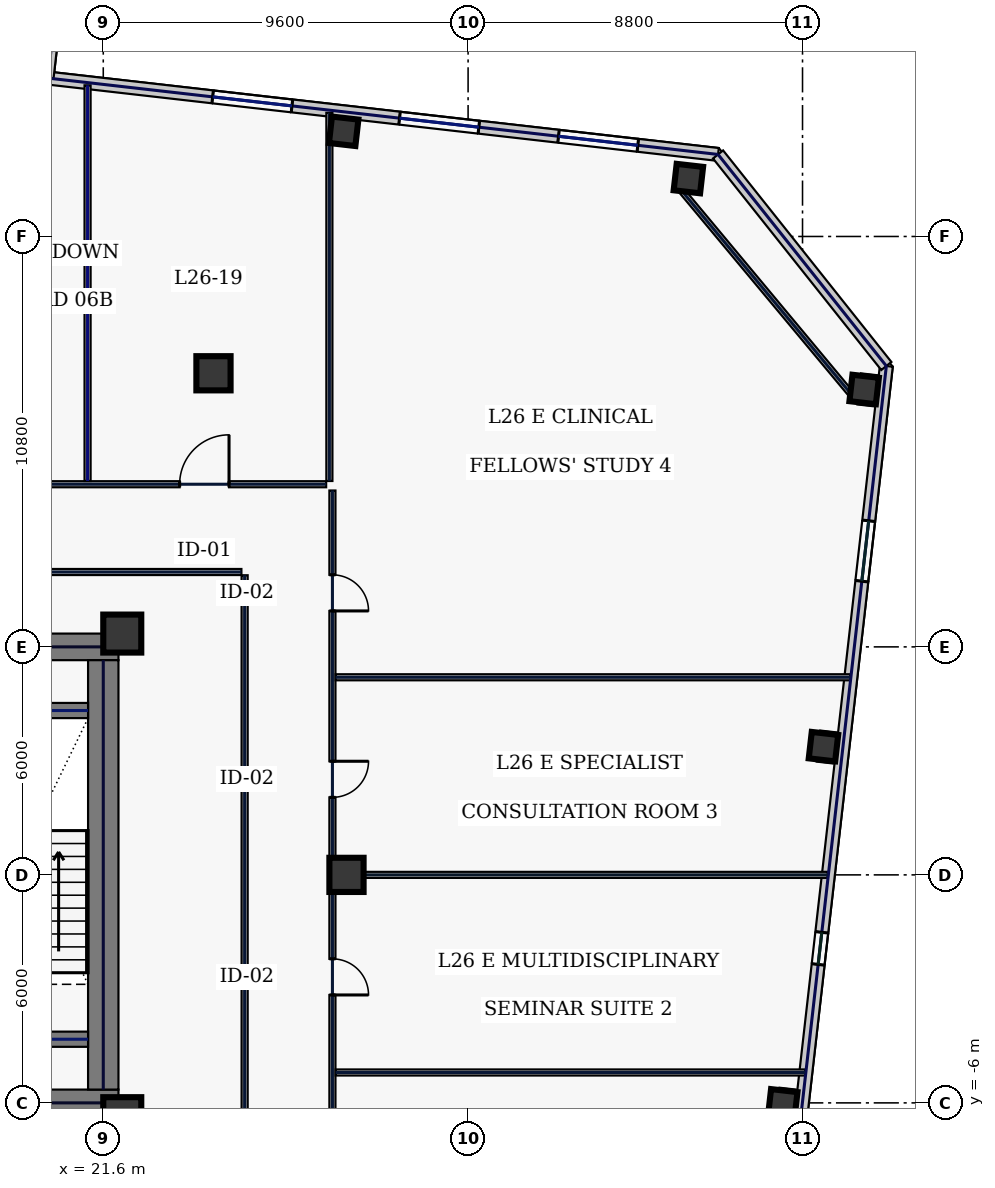
"""IFC4 building model, lengths in metres.
Left out: names, types, materials, properties, quantities, classifications, styles, units other than length and angle.
Written with IfcOpenShell. Run it as: python <this file> out.ifc"""

import sys

from ifc_helpers import new_model, si_unit, direction, frame, frame_2d, origin, origin_2d, place, context, subcontext, project, spatial, rectangle, hollow_rectangle, extrude, element, fill, save


model = new_model("IFC4")
c1 = context("Model", 3, precision=1e-05, world=origin(), true_north=direction((0.0, 1.0)))
c2 = subcontext(c1, "Body", "Model", "MODEL_VIEW")
j1 = project(units=[si_unit("LENGTHUNIT", "METRE"), si_unit("PLANEANGLEUNIT", "RADIAN")], contexts=[c1])
p1 = place(None, origin())
s1 = spatial("IfcSite", under=j1, at=p1, CompositionType="ELEMENT")
p2 = place(p1, origin())
s2 = spatial("IfcBuilding", under=s1, at=p2, CompositionType="ELEMENT")
p3 = place(p2, frame((0.0, 0.0, 117.4)))
s3 = spatial("IfcBuildingStorey", under=s2, at=p3, CompositionType="ELEMENT", Elevation=117.4)
for number, where, z_axis, x_axis in (
    (1, (10.45, 6.0, 0.0), (0.0, 0.0, 1.0), (1.0, 0.0, 0.0)),
    (2, (10.45, -6.0, 0.0), (0.0, 0.0, 1.0), (1.0, 0.0, 0.0)),
):
    element("IfcWall", number, at=place(p3, frame(where, z_axis=z_axis, x_axis=x_axis)), inside=s3, PredefinedType="SHEAR", context=c2, shape_type="SweptSolid", body=[
        extrude(rectangle(XDim=11.55, YDim=0.7, at=frame_2d((5.775, 0.0))), origin(), (0.0, 0.0, 1.0), 3.74),
    ])
p4 = place(p3, frame((21.6, -5.65, 0.0), z_axis=(0.0, 0.0, 1.0), x_axis=(0.0, 1.0, 0.0)))
e3 = element("IfcWall", 3, at=p4, inside=s3, PredefinedType="SHEAR", context=c2, shape_type="SweptSolid", body=[
    extrude(rectangle(XDim=11.3, YDim=0.8, at=frame_2d((5.65, 0.0))), origin(), (0.0, 0.0, 1.0), 3.74),
])
for number, where, z_axis, x_axis in (
    (4, (17.8, -4.325, 0.0), (0.0, 0.0, 1.0), (1.0, 0.0, 0.0)),
    (5, (17.8, 4.325, 0.0), (0.0, 0.0, 1.0), (1.0, 0.0, 0.0)),
):
    element("IfcWall", number, at=place(p3, frame(where, z_axis=z_axis, x_axis=x_axis)), inside=s3, PredefinedType="SHEAR", context=c2, shape_type="SweptSolid", body=[
        extrude(rectangle(XDim=3.4, YDim=0.4, at=frame_2d((1.7, 0.0))), origin(), (0.0, 0.0, 1.0), 3.74),
    ])
for number, where, z_axis, x_axis in (
    (6, (22.1, -6.35, 0.0), (0.0, 0.0, 1.0), (1.0, 0.0, 0.0)),
    (7, (22.1, 6.35, 0.0), (0.0, 0.0, 1.0), (1.0, 0.0, 0.0)),
):
    element("IfcColumn", number, at=place(p3, frame(where, z_axis=z_axis, x_axis=x_axis)), inside=s3, PredefinedType="COLUMN", context=c2, shape_type="SweptSolid", body=[
        extrude(hollow_rectangle(XDim=1.0, YDim=1.0, WallThickness=0.045, at=origin_2d()), origin(), (0.0, 0.0, 1.0), 3.74),
    ])
for number, where, z_axis, x_axis in (
    (8, (24.5, 13.2, 0.0), (0.0, 0.0, 1.0), (1.0, 0.0, 0.0)),
    (9, (28.0, 0.0, 0.0), (0.0, 0.0, 1.0), (1.0, 0.0, 0.0)),
):
    element("IfcColumn", number, at=place(p3, frame(where, z_axis=z_axis, x_axis=x_axis)), inside=s3, PredefinedType="COLUMN", context=c2, shape_type="SweptSolid", body=[
        extrude(hollow_rectangle(XDim=0.9, YDim=0.9, WallThickness=0.04, at=origin_2d()), origin(), (0.0, 0.0, 1.0), 3.74),
    ])
for number, where, z_axis, x_axis in (
    (10, (36.997, 18.323, 0.0), (0.0, 0.0, 1.0), (0.994, -0.113, 0.0)),
    (11, (27.926, 19.568, 0.0), (0.0, 0.0, 1.0), (0.994, -0.113, 0.0)),
    (12, (39.48, -6.025, 0.0), (0.0, 0.0, 1.0), (0.994, -0.113, 0.0)),
    (13, (40.551, 3.375, 0.0), (0.0, 0.0, 1.0), (0.994, -0.113, 0.0)),
    (14, (41.622, 12.774, 0.0), (0.0, 0.0, 1.0), (0.994, -0.113, 0.0)),
):
    element("IfcColumn", number, at=place(p3, frame(where, z_axis=z_axis, x_axis=x_axis)), inside=s3, PredefinedType="COLUMN", context=c2, shape_type="SweptSolid", body=[
        extrude(hollow_rectangle(XDim=0.7, YDim=0.7, WallThickness=0.032, at=origin_2d()), origin(), (0.0, 0.0, 1.0), 3.74),
    ])
p5 = place(p3, frame((37.777, 18.958, 0.0), z_axis=(0.0, 0.0, 1.0), x_axis=(-0.993570699365, 0.113213362125, 0.0)))
e15 = element("IfcWall", 15, at=p5, inside=s3, PredefinedType="STANDARD", context=c2, shape_type="SweptSolid", body=[
    extrude(rectangle(XDim=17.75, YDim=0.34, at=frame_2d((8.875, 0.0))), origin(), (0.0, 0.0, 1.0), 3.74),
])
p6 = place(p5, frame((11.285, 0.0, 0.67)))
e16 = element("IfcOpeningElement", 16, at=p6, cuts=e15, PredefinedType="OPENING", context=c2, shape_type="SweptSolid", body=[
    extrude(rectangle(XDim=2.1, YDim=2.2, at=frame_2d((1.05, 1.1))), frame((0.0, 0.18, 0.0), z_axis=(0.0, -1.0, 0.0), x_axis=(1.0, 0.0, 0.0)), (0.0, 0.0, 1.0), 0.36),
])
p7 = place(p5, frame((6.336, 0.0, 0.67)))
e17 = element("IfcOpeningElement", 17, at=p7, cuts=e15, PredefinedType="OPENING", context=c2, shape_type="SweptSolid", body=[
    extrude(rectangle(XDim=2.1, YDim=2.2, at=frame_2d((1.05, 1.1))), frame((0.0, 0.18, 0.0), z_axis=(0.0, -1.0, 0.0), x_axis=(1.0, 0.0, 0.0)), (0.0, 0.0, 1.0), 0.36),
])
p8 = place(p5, frame((2.125, 0.0, 0.67)))
e18 = element("IfcOpeningElement", 18, at=p8, cuts=e15, PredefinedType="OPENING", context=c2, shape_type="SweptSolid", body=[
    extrude(rectangle(XDim=2.1, YDim=2.2, at=frame_2d((1.05, 1.1))), frame((0.0, 0.18, 0.0), z_axis=(0.0, -1.0, 0.0), x_axis=(1.0, 0.0, 0.0)), (0.0, 0.0, 1.0), 0.36),
])
p9 = place(p3, frame((37.768, -25.556, 0.0), z_axis=(0.0, 0.0, 1.0), x_axis=(0.113201605824, 0.993572038877, 0.0)))
e19 = element("IfcWall", 19, at=p9, inside=s3, PredefinedType="STANDARD", context=c2, shape_type="SweptSolid", body=[
    extrude(rectangle(XDim=39.2, YDim=0.34, at=frame_2d((19.6, 0.0))), origin(), (0.0, 0.0, 1.0), 3.74),
])
p10 = place(p9, frame((4.1, 0.0, 0.58)))
e20 = element("IfcOpeningElement", 20, at=p10, cuts=e19, PredefinedType="OPENING", context=c2, shape_type="SweptSolid", body=[
    extrude(rectangle(XDim=1.6, YDim=2.3, at=frame_2d((0.8, 1.15))), frame((0.0, 0.18, 0.0), z_axis=(0.0, -1.0, 0.0), x_axis=(1.0, 0.0, 0.0)), (0.0, 0.0, 1.0), 0.36),
])
p11 = place(p9, frame((13.9, 0.0, 0.58)))
e21 = element("IfcOpeningElement", 21, at=p11, cuts=e19, PredefinedType="OPENING", context=c2, shape_type="SweptSolid", body=[
    extrude(rectangle(XDim=1.6, YDim=2.3, at=frame_2d((0.8, 1.15))), frame((0.0, 0.18, 0.0), z_axis=(0.0, -1.0, 0.0), x_axis=(1.0, 0.0, 0.0)), (0.0, 0.0, 1.0), 0.36),
])
p12 = place(p9, frame((23.35, 0.0, 0.75)))
e22 = element("IfcOpeningElement", 22, at=p12, cuts=e19, PredefinedType="OPENING", context=c2, shape_type="SweptSolid", body=[
    extrude(rectangle(XDim=0.85, YDim=1.85, at=frame_2d((0.425, 0.925))), frame((0.0, 0.18, 0.0), z_axis=(0.0, -1.0, 0.0), x_axis=(1.0, 0.0, 0.0)), (0.0, 0.0, 1.0), 0.36),
])
p13 = place(p9, frame((33.5, 0.0, 0.58)))
e23 = element("IfcOpeningElement", 23, at=p13, cuts=e19, PredefinedType="OPENING", context=c2, shape_type="SweptSolid", body=[
    extrude(rectangle(XDim=1.6, YDim=2.3, at=frame_2d((0.8, 1.15))), frame((0.0, 0.18, 0.0), z_axis=(0.0, -1.0, 0.0), x_axis=(1.0, 0.0, 0.0)), (0.0, 0.0, 1.0), 0.36),
])
p14 = place(p3, frame((42.206, 13.392, 0.0), z_axis=(0.0, 0.0, 1.0), x_axis=(-0.622524521309, 0.782600294128, 0.0)))
e24 = element("IfcWall", 24, at=p14, inside=s3, PredefinedType="STANDARD", context=c2, shape_type="SweptSolid", body=[
    extrude(rectangle(XDim=7.113, YDim=0.34, at=frame_2d((3.557, 0.0))), origin(), (0.0, 0.0, 1.0), 3.74),
])
p15 = place(p3, frame((20.141, 20.968, 0.0), z_axis=(0.0, 0.0, 1.0), x_axis=(0.113222704107, 0.993569634839, 0.0)))
e25 = element("IfcWall", 25, at=p15, inside=s3, PredefinedType="STANDARD", context=c2, shape_type="SweptSolid", body=[
    extrude(rectangle(XDim=2.87, YDim=0.3, at=frame_2d((1.435, 0.0))), origin(), (0.0, 0.0, 1.0), 1.535),
])
p16 = place(p3, frame((41.361, 12.556, 0.0), z_axis=(0.0, 0.0, 1.0), x_axis=(-0.640217638562, 0.768193579298, 0.0)))
e26 = element("IfcWall", 26, at=p16, inside=s3, PredefinedType="PARTITIONING", context=c2, shape_type="SweptSolid", body=[
    extrude(rectangle(XDim=7.224, YDim=0.16, at=frame_2d((3.612, 0.0))), origin(), (0.0, 0.0, 1.0), 3.74),
])
p17 = place(p3, frame((-27.465, 10.28, 0.0), z_axis=(0.0, 0.0, 1.0), x_axis=(1.0, 0.0, 0.0)))
e27 = element("IfcWall", 27, at=p17, inside=s3, PredefinedType="PARTITIONING", context=c2, shape_type="SweptSolid", body=[
    extrude(rectangle(XDim=54.93, YDim=0.16, at=frame_2d((27.465, 0.0))), origin(), (0.0, 0.0, 1.0), 3.74),
])
p18 = place(p17, frame((2.044, 0.0, 0.0)))
e28 = element("IfcOpeningElement", 28, at=p18, cuts=e27, PredefinedType="OPENING", context=c2, shape_type="SweptSolid", body=[
    extrude(rectangle(XDim=0.95, YDim=2.2, at=frame_2d((0.475, 1.1))), frame((0.0, 0.09, 0.0), z_axis=(0.0, -1.0, 0.0), x_axis=(1.0, 0.0, 0.0)), (0.0, 0.0, 1.0), 0.18),
])
p19 = place(p17, frame((8.075, 0.0, 0.0)))
e29 = element("IfcOpeningElement", 29, at=p19, cuts=e27, PredefinedType="OPENING", context=c2, shape_type="SweptSolid", body=[
    extrude(rectangle(XDim=0.95, YDim=2.2, at=frame_2d((0.475, 1.1))), frame((0.0, 0.09, 0.0), z_axis=(0.0, -1.0, 0.0), x_axis=(1.0, 0.0, 0.0)), (0.0, 0.0, 1.0), 0.18),
])
p20 = place(p17, frame((15.55, 0.0, 0.0)))
e30 = element("IfcOpeningElement", 30, at=p20, cuts=e27, PredefinedType="OPENING", context=c2, shape_type="SweptSolid", body=[
    extrude(rectangle(XDim=1.3, YDim=2.2, at=frame_2d((0.65, 1.1))), frame((0.0, 0.09, 0.0), z_axis=(0.0, -1.0, 0.0), x_axis=(1.0, 0.0, 0.0)), (0.0, 0.0, 1.0), 0.18),
])
p21 = place(p17, frame((23.775, 0.0, 0.0)))
e31 = element("IfcOpeningElement", 31, at=p21, cuts=e27, PredefinedType="OPENING", context=c2, shape_type="SweptSolid", body=[
    extrude(rectangle(XDim=1.05, YDim=2.2, at=frame_2d((0.525, 1.1))), frame((0.0, 0.09, 0.0), z_axis=(0.0, -1.0, 0.0), x_axis=(1.0, 0.0, 0.0)), (0.0, 0.0, 1.0), 0.18),
])
p22 = place(p17, frame((32.375, 0.0, 0.0)))
e32 = element("IfcOpeningElement", 32, at=p22, cuts=e27, PredefinedType="OPENING", context=c2, shape_type="SweptSolid", body=[
    extrude(rectangle(XDim=0.95, YDim=2.2, at=frame_2d((0.475, 1.1))), frame((0.0, 0.09, 0.0), z_axis=(0.0, -1.0, 0.0), x_axis=(1.0, 0.0, 0.0)), (0.0, 0.0, 1.0), 0.18),
])
p23 = place(p17, frame((39.795, 0.0, 0.0)))
e33 = element("IfcOpeningElement", 33, at=p23, cuts=e27, PredefinedType="OPENING", context=c2, shape_type="SweptSolid", body=[
    extrude(rectangle(XDim=1.45, YDim=2.2, at=frame_2d((0.725, 1.1))), frame((0.0, 0.09, 0.0), z_axis=(0.0, -1.0, 0.0), x_axis=(1.0, 0.0, 0.0)), (0.0, 0.0, 1.0), 0.18),
])
p24 = place(p17, frame((45.588, 0.0, 0.0)))
e34 = element("IfcOpeningElement", 34, at=p24, cuts=e27, PredefinedType="OPENING", context=c2, shape_type="SweptSolid", body=[
    extrude(rectangle(XDim=1.3, YDim=2.2, at=frame_2d((0.65, 1.1))), frame((0.0, 0.09, 0.0), z_axis=(0.0, -1.0, 0.0), x_axis=(1.0, 0.0, 0.0)), (0.0, 0.0, 1.0), 0.18),
])
p25 = place(p17, frame((51.074, 0.0, 0.0)))
e35 = element("IfcOpeningElement", 35, at=p25, cuts=e27, PredefinedType="OPENING", context=c2, shape_type="SweptSolid", body=[
    extrude(rectangle(XDim=1.3, YDim=2.2, at=frame_2d((0.65, 1.1))), frame((0.0, 0.09, 0.0), z_axis=(0.0, -1.0, 0.0), x_axis=(1.0, 0.0, 0.0)), (0.0, 0.0, 1.0), 0.18),
])
p26 = place(p3, frame((27.63, 10.115, 0.0), z_axis=(0.0, 0.0, 1.0), x_axis=(0.0, -1.0, 0.0)))
e36 = element("IfcWall", 36, at=p26, inside=s3, PredefinedType="PARTITIONING", context=c2, shape_type="SweptSolid", body=[
    extrude(rectangle(XDim=20.13, YDim=0.16, at=frame_2d((10.065, 0.0))), origin(), (0.0, 0.0, 1.0), 3.74),
])
p27 = place(p26, frame((17.181, 0.0, 0.0)))
e37 = element("IfcOpeningElement", 37, at=p27, cuts=e36, PredefinedType="OPENING", context=c2, shape_type="SweptSolid", body=[
    extrude(rectangle(XDim=0.95, YDim=2.2, at=frame_2d((0.475, 1.1))), frame((0.0, 0.09, 0.0), z_axis=(0.0, -1.0, 0.0), x_axis=(1.0, 0.0, 0.0)), (0.0, 0.0, 1.0), 0.18),
])
p28 = place(p26, frame((12.325, 0.0, 0.0)))
e38 = element("IfcOpeningElement", 38, at=p28, cuts=e36, PredefinedType="OPENING", context=c2, shape_type="SweptSolid", body=[
    extrude(rectangle(XDim=0.95, YDim=2.2, at=frame_2d((0.475, 1.1))), frame((0.0, 0.09, 0.0), z_axis=(0.0, -1.0, 0.0), x_axis=(1.0, 0.0, 0.0)), (0.0, 0.0, 1.0), 0.18),
])
p29 = place(p26, frame((7.125, 0.0, 0.0)))
e39 = element("IfcOpeningElement", 39, at=p29, cuts=e36, PredefinedType="OPENING", context=c2, shape_type="SweptSolid", body=[
    extrude(rectangle(XDim=0.95, YDim=2.2, at=frame_2d((0.475, 1.1))), frame((0.0, 0.09, 0.0), z_axis=(0.0, -1.0, 0.0), x_axis=(1.0, 0.0, 0.0)), (0.0, 0.0, 1.0), 0.18),
])
p30 = place(p26, frame((2.219, 0.0, 0.0)))
e40 = element("IfcOpeningElement", 40, at=p30, cuts=e36, PredefinedType="OPENING", context=c2, shape_type="SweptSolid", body=[
    extrude(rectangle(XDim=0.95, YDim=2.2, at=frame_2d((0.475, 1.1))), frame((0.0, 0.09, 0.0), z_axis=(0.0, -1.0, 0.0), x_axis=(1.0, 0.0, 0.0)), (0.0, 0.0, 1.0), 0.18),
])
p31 = place(p3, frame((25.235, 7.97, 0.0), z_axis=(0.0, 0.0, 1.0), x_axis=(-1.0, 0.0, 0.0)))
e41 = element("IfcWall", 41, at=p31, inside=s3, PredefinedType="PARTITIONING", context=c2, shape_type="SweptSolid", body=[
    extrude(rectangle(XDim=14.57, YDim=0.16, at=frame_2d((7.285, 0.0))), origin(), (0.0, 0.0, 1.0), 3.74),
])
p32 = place(p3, frame((25.32, -7.785, 0.0), z_axis=(0.0, 0.0, 1.0), x_axis=(0.0, 1.0, 0.0)))
e42 = element("IfcWall", 42, at=p32, inside=s3, PredefinedType="PARTITIONING", context=c2, shape_type="SweptSolid", body=[
    extrude(rectangle(XDim=15.67, YDim=0.16, at=frame_2d((7.835, 0.0))), origin(), (0.0, 0.0, 1.0), 3.74),
])
p33 = place(p3, frame((27.55, 10.365, 0.0), z_axis=(0.0, 0.0, 1.0), x_axis=(0.0, 1.0, 0.0)))
e43 = element("IfcWall", 43, at=p33, inside=s3, PredefinedType="PARTITIONING", context=c2, shape_type="SweptSolid", body=[
    extrude(rectangle(XDim=9.688, YDim=0.16, at=frame_2d((4.844, 0.0))), origin(), (0.0, 0.0, 1.0), 3.74),
])
p34 = place(p3, frame((21.187, 10.365, 0.0), z_axis=(0.0, 0.0, 1.0), x_axis=(0.0, 1.0, 0.0)))
e44 = element("IfcWall", 44, at=p34, inside=s3, PredefinedType="PARTITIONING", context=c2, shape_type="SweptSolid", body=[
    extrude(rectangle(XDim=10.413, YDim=0.16, at=frame_2d((5.207, 0.0))), origin(), (0.0, 0.0, 1.0), 1.535),
])
p35 = place(p3, frame((27.715, -5.2, 0.0), z_axis=(0.0, 0.0, 1.0), x_axis=(1.0, 0.0, 0.0)))
e45 = element("IfcWall", 45, at=p35, inside=s3, PredefinedType="PARTITIONING", context=c2, shape_type="SweptSolid", body=[
    extrude(rectangle(XDim=12.352, YDim=0.16, at=frame_2d((6.176, 0.0))), origin(), (0.0, 0.0, 1.0), 3.74),
])
p36 = place(p3, frame((27.715, 0.0, 0.0), z_axis=(0.0, 0.0, 1.0), x_axis=(1.0, 0.0, 0.0)))
e46 = element("IfcWall", 46, at=p36, inside=s3, PredefinedType="PARTITIONING", context=c2, shape_type="SweptSolid", body=[
    extrude(rectangle(XDim=12.945, YDim=0.16, at=frame_2d((6.472, 0.0))), origin(), (0.0, 0.0, 1.0), 3.235),
])
p37 = place(p3, frame((27.715, 5.2, 0.0), z_axis=(0.0, 0.0, 1.0), x_axis=(1.0, 0.0, 0.0)))
e47 = element("IfcWall", 47, at=p37, inside=s3, PredefinedType="PARTITIONING", context=c2, shape_type="SweptSolid", body=[
    extrude(rectangle(XDim=13.537, YDim=0.16, at=frame_2d((6.769, 0.0))), origin(), (0.0, 0.0, 1.0), 3.74),
])
p38 = place(p6, origin())
e48 = element("IfcWindow", 48, at=p38, inside=s3, PartitioningType="SINGLE_PANEL", PredefinedType="WINDOW", context=c2, shape_type="SweptSolid", body=[
    extrude(rectangle(XDim=2.1, YDim=2.2, at=frame_2d((1.05, 1.1))), frame((0.0, 0.03, 0.0), z_axis=(0.0, -1.0, 0.0), x_axis=(1.0, 0.0, 0.0)), (0.0, 0.0, 1.0), 0.06),
])
fill(e16, e48)
p39 = place(p7, origin())
e49 = element("IfcWindow", 49, at=p39, inside=s3, PartitioningType="SINGLE_PANEL", PredefinedType="WINDOW", context=c2, shape_type="SweptSolid", body=[
    extrude(rectangle(XDim=2.1, YDim=2.2, at=frame_2d((1.05, 1.1))), frame((0.0, 0.03, 0.0), z_axis=(0.0, -1.0, 0.0), x_axis=(1.0, 0.0, 0.0)), (0.0, 0.0, 1.0), 0.06),
])
fill(e17, e49)
p40 = place(p8, origin())
e50 = element("IfcWindow", 50, at=p40, inside=s3, PartitioningType="SINGLE_PANEL", PredefinedType="WINDOW", context=c2, shape_type="SweptSolid", body=[
    extrude(rectangle(XDim=2.1, YDim=2.2, at=frame_2d((1.05, 1.1))), frame((0.0, 0.03, 0.0), z_axis=(0.0, -1.0, 0.0), x_axis=(1.0, 0.0, 0.0)), (0.0, 0.0, 1.0), 0.06),
])
fill(e18, e50)
p41 = place(p12, origin())
e51 = element("IfcWindow", 51, at=p41, inside=s3, PartitioningType="SINGLE_PANEL", PredefinedType="WINDOW", context=c2, shape_type="SweptSolid", body=[
    extrude(rectangle(XDim=0.85, YDim=1.85, at=frame_2d((0.425, 0.925))), frame((0.0, 0.03, 0.0), z_axis=(0.0, -1.0, 0.0), x_axis=(1.0, 0.0, 0.0)), (0.0, 0.0, 1.0), 0.06),
])
fill(e22, e51)
p42 = place(p13, origin())
e52 = element("IfcWindow", 52, at=p42, inside=s3, PartitioningType="SINGLE_PANEL", PredefinedType="WINDOW", context=c2, shape_type="SweptSolid", body=[
    extrude(rectangle(XDim=1.6, YDim=2.3, at=frame_2d((0.8, 1.15))), frame((0.0, 0.03, 0.0), z_axis=(0.0, -1.0, 0.0), x_axis=(1.0, 0.0, 0.0)), (0.0, 0.0, 1.0), 0.06),
])
fill(e23, e52)
p43 = place(p25, origin())
e53 = element("IfcDoor", 53, at=p43, inside=s3, OperationType="SINGLE_SWING_RIGHT", PredefinedType="DOOR", context=c2, shape_type="SweptSolid", body=[
    extrude(rectangle(XDim=1.3, YDim=2.2, at=frame_2d((0.65, 1.1))), frame((0.0, 0.025, 0.0), z_axis=(0.0, -1.0, 0.0), x_axis=(1.0, 0.0, 0.0)), (0.0, 0.0, 1.0), 0.05),
])
fill(e35, e53)
p44 = place(p28, origin())
e54 = element("IfcDoor", 54, at=p44, inside=s3, OperationType="SINGLE_SWING_RIGHT", PredefinedType="DOOR", context=c2, shape_type="SweptSolid", body=[
    extrude(rectangle(XDim=0.95, YDim=2.2, at=frame_2d((0.475, 1.1))), frame((0.0, 0.025, 0.0), z_axis=(0.0, -1.0, 0.0), x_axis=(1.0, 0.0, 0.0)), (0.0, 0.0, 1.0), 0.05),
])
fill(e38, e54)
p45 = place(p29, origin())
e55 = element("IfcDoor", 55, at=p45, inside=s3, OperationType="SINGLE_SWING_LEFT", PredefinedType="DOOR", context=c2, shape_type="SweptSolid", body=[
    extrude(rectangle(XDim=0.95, YDim=2.2, at=frame_2d((0.475, 1.1))), frame((0.0, 0.025, 0.0), z_axis=(0.0, -1.0, 0.0), x_axis=(1.0, 0.0, 0.0)), (0.0, 0.0, 1.0), 0.05),
])
fill(e39, e55)
p46 = place(p30, origin())
e56 = element("IfcDoor", 56, at=p46, inside=s3, OperationType="SINGLE_SWING_RIGHT", PredefinedType="DOOR", context=c2, shape_type="SweptSolid", body=[
    extrude(rectangle(XDim=0.95, YDim=2.2, at=frame_2d((0.475, 1.1))), frame((0.0, 0.025, 0.0), z_axis=(0.0, -1.0, 0.0), x_axis=(1.0, 0.0, 0.0)), (0.0, 0.0, 1.0), 0.05),
])
fill(e40, e56)
save(model, sys.argv[1])
